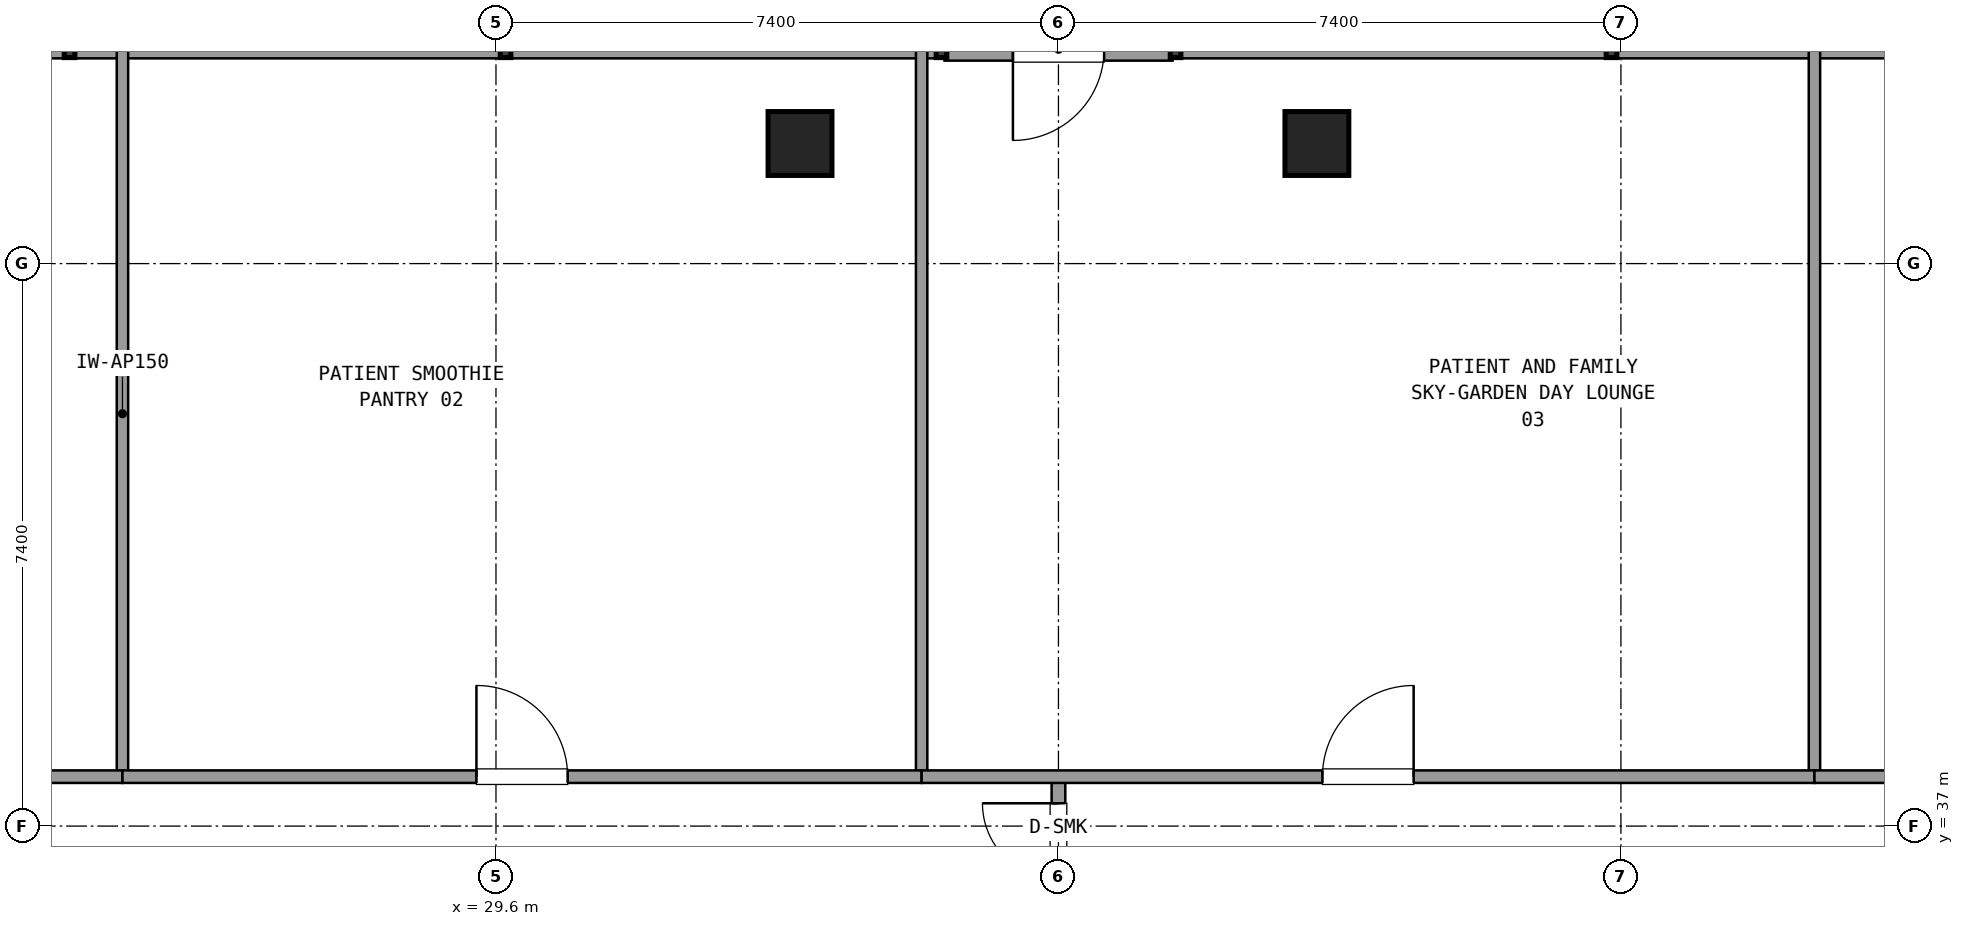
"""IFC4 building model, lengths in metres.
Left out: names, types, materials, properties, quantities, classifications, styles, units other than length and angle.
Written with IfcOpenShell. Run it as: python <this file> out.ifc"""

import sys

from ifc_helpers import new_model, si_unit, direction, frame, frame_2d, origin, origin_2d, place, context, subcontext, project, spatial, rectangle, extrude, element, fill, save


model = new_model("IFC4")
c1 = context("Model", 3, precision=1e-05, world=origin(), true_north=direction((0.0, 1.0)))
c2 = subcontext(c1, "Body", "Model", "MODEL_VIEW")
j1 = project(units=[si_unit("LENGTHUNIT", "METRE"), si_unit("PLANEANGLEUNIT", "RADIAN")], contexts=[c1])
p1 = place(None, origin())
s1 = spatial("IfcSite", under=j1, at=p1, CompositionType="ELEMENT")
p2 = place(p1, origin())
s2 = spatial("IfcBuilding", under=s1, at=p2, CompositionType="ELEMENT")
p3 = place(p2, frame((0.0, 0.0, 268.02)))
s3 = spatial("IfcBuildingStorey", under=s2, at=p3, CompositionType="ELEMENT", Elevation=268.02)
for number, where, z_axis, x_axis in (
    (1, (40.4, 45.98, 0.0), (0.0, 0.0, 1.0), (1.0, 0.0, 0.0)),
    (2, (33.6, 45.98, 0.0), (0.0, 0.0, 1.0), (1.0, 0.0, 0.0)),
):
    element("IfcColumn", number, at=place(p3, frame(where, z_axis=z_axis, x_axis=x_axis)), inside=s3, PredefinedType="COLUMN", context=c2, shape_type="SweptSolid", body=[
        extrude(rectangle(XDim=0.84, YDim=0.84, at=origin_2d()), origin(), (0.0, 0.0, 1.0), 3.6),
    ])
p4 = place(p3, frame((38.501, 47.22, 0.0), z_axis=(0.0, 0.0, 1.0), x_axis=(-1.0, 0.0, 0.0)))
e3 = element("IfcWall", 3, at=p4, inside=s3, PredefinedType="SOLIDWALL", context=c2, shape_type="SweptSolid", body=[
    extrude(rectangle(XDim=3.0, YDim=0.3, at=frame_2d((1.5, 0.0))), origin(), (0.0, 0.0, 1.0), 2.69),
])
p5 = place(p4, frame((0.9, 0.0, 0.0)))
e4 = element("IfcOpeningElement", 4, at=p5, cuts=e3, PredefinedType="OPENING", context=c2, shape_type="SweptSolid", body=[
    extrude(rectangle(XDim=1.2, YDim=2.2, at=frame_2d((0.6, 1.1))), frame((0.0, 0.16, 0.0), z_axis=(0.0, -1.0, 0.0), x_axis=(1.0, 0.0, 0.0)), (0.0, 0.0, 1.0), 0.32),
])
p6 = place(p3, frame((55.745, 47.22, 0.0), z_axis=(0.0, 0.0, 1.0), x_axis=(-1.0, 0.0, 0.0)))
e5 = element("IfcWall", 5, at=p6, inside=s3, PredefinedType="SOLIDWALL", context=c2, shape_type="SweptSolid", body=[
    extrude(rectangle(XDim=17.204, YDim=0.24, at=frame_2d((8.602, 0.0))), origin(), (0.0, 0.0, 1.0), 0.85),
])
p7 = place(p3, frame((35.461, 47.22, 0.0), z_axis=(0.0, 0.0, 1.0), x_axis=(-1.0, 0.0, 0.0)))
e6 = element("IfcWall", 6, at=p7, inside=s3, PredefinedType="SOLIDWALL", context=c2, shape_type="SweptSolid", body=[
    extrude(rectangle(XDim=17.206, YDim=0.24, at=frame_2d((8.603, 0.0))), origin(), (0.0, 0.0, 1.0), 0.85),
])
p8 = place(p3, frame((37.0, 34.95, 0.0), z_axis=(0.0, 0.0, 1.0), x_axis=(0.0, 1.0, 0.0)))
e7 = element("IfcWall", 7, at=p8, inside=s3, PredefinedType="PARTITIONING", context=c2, shape_type="SweptSolid", body=[
    extrude(rectangle(XDim=2.7, YDim=0.18, at=frame_2d((1.35, 0.0))), origin(), (0.0, 0.0, 1.0), 2.61),
])
p9 = place(p8, frame((0.35, 0.0, 0.0)))
e8 = element("IfcOpeningElement", 8, at=p9, cuts=e7, PredefinedType="OPENING", context=c2, shape_type="SweptSolid", body=[
    extrude(rectangle(XDim=2.0, YDim=2.2, at=frame_2d((1.0, 1.1))), frame((0.0, 0.1, 0.0), z_axis=(0.0, -1.0, 0.0), x_axis=(1.0, 0.0, 0.0)), (0.0, 0.0, 1.0), 0.2),
])
p10 = place(p3, frame((24.686, 37.65, 0.0), z_axis=(0.0, 0.0, 1.0), x_axis=(0.0, 1.0, 0.0)))
e9 = element("IfcWall", 9, at=p10, inside=s3, PredefinedType="PARTITIONING", context=c2, shape_type="SweptSolid", body=[
    extrude(rectangle(XDim=9.55, YDim=0.15, at=frame_2d((4.775, 0.0))), origin(), (0.0, 0.0, 1.0), 2.61),
])
p11 = place(p3, frame((21.1, 37.65, 0.0), z_axis=(0.0, 0.0, 1.0), x_axis=(1.0, 0.0, 0.0)))
e10 = element("IfcWall", 10, at=p11, inside=s3, PredefinedType="PARTITIONING", context=c2, shape_type="SweptSolid", body=[
    extrude(rectangle(XDim=3.586, YDim=0.165, at=frame_2d((1.793, 0.0))), origin(), (0.0, 0.0, 1.0), 2.61),
])
p12 = place(p11, frame((1.193, 0.0, 0.0)))
e11 = element("IfcOpeningElement", 11, at=p12, cuts=e10, PredefinedType="OPENING", context=c2, shape_type="SweptSolid", body=[
    extrude(rectangle(XDim=1.2, YDim=2.15, at=frame_2d((0.6, 1.075))), frame((0.0, 0.093, 0.0), z_axis=(0.0, -1.0, 0.0), x_axis=(1.0, 0.0, 0.0)), (0.0, 0.0, 1.0), 0.185),
])
p13 = place(p3, frame((35.2, 37.65, 0.0), z_axis=(0.0, 0.0, 1.0), x_axis=(0.0, 1.0, 0.0)))
e12 = element("IfcWall", 12, at=p13, inside=s3, PredefinedType="PARTITIONING", context=c2, shape_type="SweptSolid", body=[
    extrude(rectangle(XDim=9.55, YDim=0.15, at=frame_2d((4.775, 0.0))), origin(), (0.0, 0.0, 1.0), 2.61),
])
p14 = place(p3, frame((24.686, 37.65, 0.0), z_axis=(0.0, 0.0, 1.0), x_axis=(1.0, 0.0, 0.0)))
e13 = element("IfcWall", 13, at=p14, inside=s3, PredefinedType="PARTITIONING", context=c2, shape_type="SweptSolid", body=[
    extrude(rectangle(XDim=10.514, YDim=0.165, at=frame_2d((5.257, 0.0))), origin(), (0.0, 0.0, 1.0), 2.61),
])
p15 = place(p14, frame((4.657, 0.0, 0.0)))
e14 = element("IfcOpeningElement", 14, at=p15, cuts=e13, PredefinedType="OPENING", context=c2, shape_type="SweptSolid", body=[
    extrude(rectangle(XDim=1.2, YDim=2.15, at=frame_2d((0.6, 1.075))), frame((0.0, 0.093, 0.0), z_axis=(0.0, -1.0, 0.0), x_axis=(1.0, 0.0, 0.0)), (0.0, 0.0, 1.0), 0.185),
])
p16 = place(p3, frame((46.946, 37.65, 0.0), z_axis=(0.0, 0.0, 1.0), x_axis=(0.0, 1.0, 0.0)))
e15 = element("IfcWall", 15, at=p16, inside=s3, PredefinedType="PARTITIONING", context=c2, shape_type="SweptSolid", body=[
    extrude(rectangle(XDim=9.55, YDim=0.15, at=frame_2d((4.775, 0.0))), origin(), (0.0, 0.0, 1.0), 2.61),
])
p17 = place(p3, frame((35.2, 37.65, 0.0), z_axis=(0.0, 0.0, 1.0), x_axis=(1.0, 0.0, 0.0)))
e16 = element("IfcWall", 16, at=p17, inside=s3, PredefinedType="PARTITIONING", context=c2, shape_type="SweptSolid", body=[
    extrude(rectangle(XDim=11.746, YDim=0.165, at=frame_2d((5.873, 0.0))), origin(), (0.0, 0.0, 1.0), 2.61),
])
p18 = place(p17, frame((5.273, 0.0, 0.0)))
e17 = element("IfcOpeningElement", 17, at=p18, cuts=e16, PredefinedType="OPENING", context=c2, shape_type="SweptSolid", body=[
    extrude(rectangle(XDim=1.2, YDim=2.15, at=frame_2d((0.6, 1.075))), frame((0.0, 0.093, 0.0), z_axis=(0.0, -1.0, 0.0), x_axis=(1.0, 0.0, 0.0)), (0.0, 0.0, 1.0), 0.185),
])
p19 = place(p3, frame((46.946, 37.65, 0.0), z_axis=(0.0, 0.0, 1.0), x_axis=(1.0, 0.0, 0.0)))
e18 = element("IfcWall", 18, at=p19, inside=s3, PredefinedType="PARTITIONING", context=c2, shape_type="SweptSolid", body=[
    extrude(rectangle(XDim=5.954, YDim=0.165, at=frame_2d((2.977, 0.0))), origin(), (0.0, 0.0, 1.0), 2.61),
])
p20 = place(p19, frame((2.377, 0.0, 0.0)))
e19 = element("IfcOpeningElement", 19, at=p20, cuts=e18, PredefinedType="OPENING", context=c2, shape_type="SweptSolid", body=[
    extrude(rectangle(XDim=1.2, YDim=2.15, at=frame_2d((0.6, 1.075))), frame((0.0, 0.093, 0.0), z_axis=(0.0, -1.0, 0.0), x_axis=(1.0, 0.0, 0.0)), (0.0, 0.0, 1.0), 0.185),
])
p21 = place(p9, origin())
e20 = element("IfcDoor", 20, at=p21, inside=s3, OperationType="DOUBLE_DOOR_SINGLE_SWING", PredefinedType="DOOR", context=c2, shape_type="SweptSolid", body=[
    extrude(rectangle(XDim=2.0, YDim=2.2, at=frame_2d((1.0, 1.1))), frame((0.0, 0.025, 0.0), z_axis=(0.0, -1.0, 0.0), x_axis=(1.0, 0.0, 0.0)), (0.0, 0.0, 1.0), 0.05),
])
fill(e8, e20)
p22 = place(p15, origin())
e21 = element("IfcDoor", 21, at=p22, inside=s3, OperationType="SINGLE_SWING_LEFT", PredefinedType="DOOR", context=c2, shape_type="SweptSolid", body=[
    extrude(rectangle(XDim=1.2, YDim=2.15, at=frame_2d((0.6, 1.075))), frame((0.0, 0.025, 0.0), z_axis=(0.0, -1.0, 0.0), x_axis=(1.0, 0.0, 0.0)), (0.0, 0.0, 1.0), 0.05),
])
fill(e14, e21)
p23 = place(p18, origin())
e22 = element("IfcDoor", 22, at=p23, inside=s3, OperationType="SINGLE_SWING_RIGHT", PredefinedType="DOOR", context=c2, shape_type="SweptSolid", body=[
    extrude(rectangle(XDim=1.2, YDim=2.15, at=frame_2d((0.6, 1.075))), frame((0.0, 0.025, 0.0), z_axis=(0.0, -1.0, 0.0), x_axis=(1.0, 0.0, 0.0)), (0.0, 0.0, 1.0), 0.05),
])
fill(e17, e22)
save(model, sys.argv[1])
